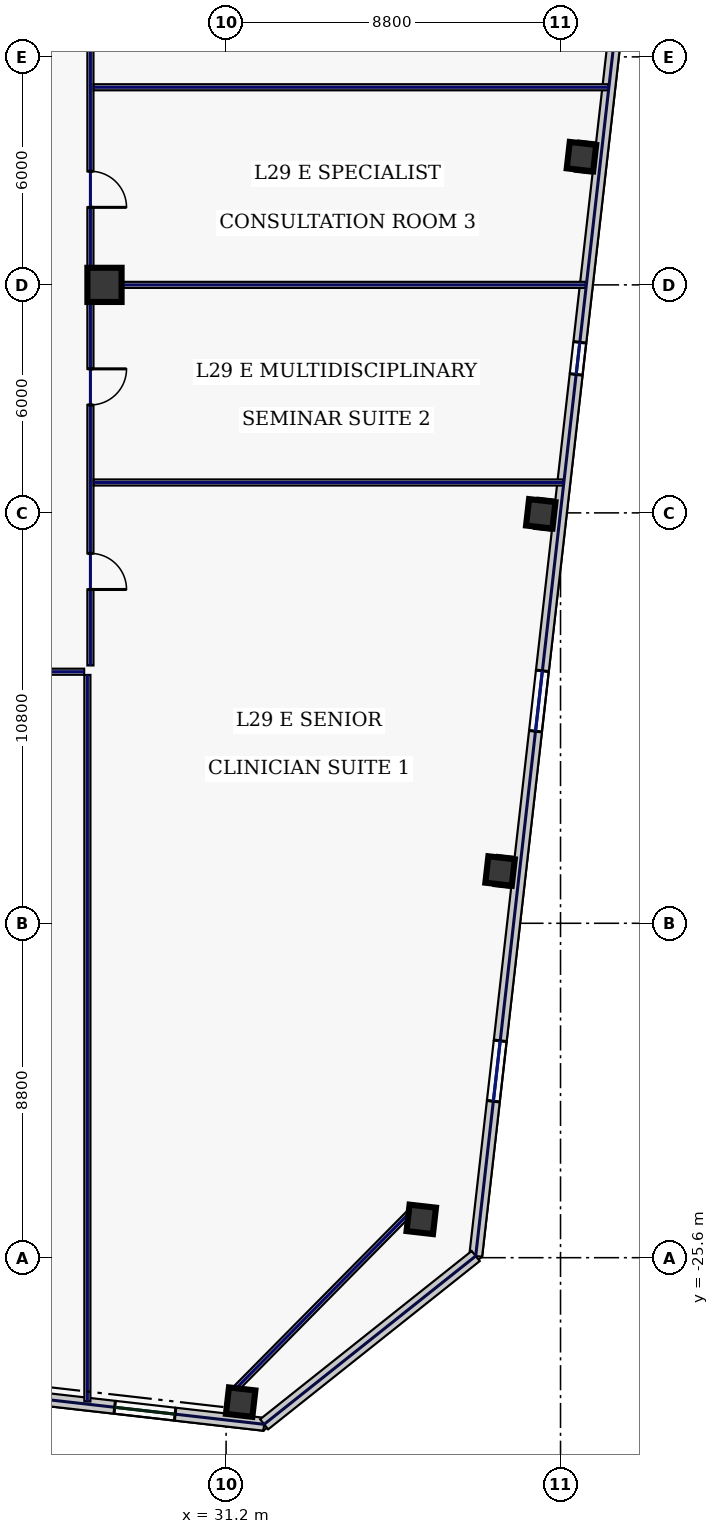
"""IFC4 building model, lengths in metres.
Left out: names, types, materials, properties, quantities, classifications, styles, units other than length and angle.
Written with IfcOpenShell. Run it as: python <this file> out.ifc"""

import sys

from ifc_helpers import new_model, si_unit, direction, frame, frame_2d, origin, origin_2d, place, context, subcontext, project, spatial, rectangle, hollow_rectangle, extrude, element, fill, save


model = new_model("IFC4")
c1 = context("Model", 3, precision=1e-05, world=origin(), true_north=direction((0.0, 1.0)))
c2 = subcontext(c1, "Body", "Model", "MODEL_VIEW")
j1 = project(units=[si_unit("LENGTHUNIT", "METRE"), si_unit("PLANEANGLEUNIT", "RADIAN")], contexts=[c1])
p1 = place(None, origin())
s1 = spatial("IfcSite", under=j1, at=p1, CompositionType="ELEMENT")
p2 = place(p1, origin())
s2 = spatial("IfcBuilding", under=s1, at=p2, CompositionType="ELEMENT")
p3 = place(p2, frame((0.0, 0.0, 129.4)))
s3 = spatial("IfcBuildingStorey", under=s2, at=p3, CompositionType="ELEMENT", Elevation=129.4)
p4 = place(p3, frame((28.0, 0.0, 0.0), z_axis=(0.0, 0.0, 1.0), x_axis=(1.0, 0.0, 0.0)))
e1 = element("IfcColumn", 1, at=p4, inside=s3, PredefinedType="COLUMN", context=c2, shape_type="SweptSolid", body=[
    extrude(hollow_rectangle(XDim=0.9, YDim=0.9, WallThickness=0.04, at=origin_2d()), origin(), (0.0, 0.0, 1.0), 3.74),
])
for number, where, z_axis, x_axis in (
    (2, (31.583, -29.401, 0.0), (0.0, 0.0, 1.0), (0.994, -0.113, 0.0)),
    (3, (36.336, -24.592, 0.0), (0.0, 0.0, 1.0), (0.994, -0.113, 0.0)),
    (4, (38.409, -15.424, 0.0), (0.0, 0.0, 1.0), (0.994, -0.113, 0.0)),
    (5, (39.48, -6.025, 0.0), (0.0, 0.0, 1.0), (0.994, -0.113, 0.0)),
    (6, (40.551, 3.375, 0.0), (0.0, 0.0, 1.0), (0.994, -0.113, 0.0)),
):
    element("IfcColumn", number, at=place(p3, frame(where, z_axis=z_axis, x_axis=x_axis)), inside=s3, PredefinedType="COLUMN", context=c2, shape_type="SweptSolid", body=[
        extrude(hollow_rectangle(XDim=0.7, YDim=0.7, WallThickness=0.032, at=origin_2d()), origin(), (0.0, 0.0, 1.0), 3.74),
    ])
p5 = place(p3, frame((11.115, -27.582, 0.0), z_axis=(0.0, 0.0, 1.0), x_axis=(0.993572655904, -0.113196190044, 0.0)))
e7 = element("IfcWall", 7, at=p5, inside=s3, PredefinedType="STANDARD", context=c2, shape_type="SweptSolid", body=[
    extrude(rectangle(XDim=21.223, YDim=0.34, at=frame_2d((10.611, 0.0))), origin(), (0.0, 0.0, 1.0), 3.74),
])
p6 = place(p5, frame((3.616, 0.0, 0.67)))
e8 = element("IfcOpeningElement", 8, at=p6, cuts=e7, PredefinedType="OPENING", context=c2, shape_type="SweptSolid", body=[
    extrude(rectangle(XDim=2.1, YDim=2.2, at=frame_2d((1.05, 1.1))), frame((0.0, 0.18, 0.0), z_axis=(0.0, -1.0, 0.0), x_axis=(1.0, 0.0, 0.0)), (0.0, 0.0, 1.0), 0.36),
])
p7 = place(p5, frame((7.838, 0.0, 0.67)))
e9 = element("IfcOpeningElement", 9, at=p7, cuts=e7, PredefinedType="OPENING", context=c2, shape_type="SweptSolid", body=[
    extrude(rectangle(XDim=2.1, YDim=2.2, at=frame_2d((1.05, 1.1))), frame((0.0, 0.18, 0.0), z_axis=(0.0, -1.0, 0.0), x_axis=(1.0, 0.0, 0.0)), (0.0, 0.0, 1.0), 0.36),
])
p8 = place(p5, frame((12.794, 0.0, 0.67)))
e10 = element("IfcOpeningElement", 10, at=p8, cuts=e7, PredefinedType="OPENING", context=c2, shape_type="SweptSolid", body=[
    extrude(rectangle(XDim=2.1, YDim=2.2, at=frame_2d((1.05, 1.1))), frame((0.0, 0.18, 0.0), z_axis=(0.0, -1.0, 0.0), x_axis=(1.0, 0.0, 0.0)), (0.0, 0.0, 1.0), 0.36),
])
p9 = place(p5, frame((17.265, 0.0, 0.22)))
e11 = element("IfcOpeningElement", 11, at=p9, cuts=e7, PredefinedType="OPENING", context=c2, shape_type="SweptSolid", body=[
    extrude(rectangle(XDim=1.6, YDim=1.2, at=frame_2d((0.8, 0.6))), frame((0.0, 0.18, 0.0), z_axis=(0.0, -1.0, 0.0), x_axis=(1.0, 0.0, 0.0)), (0.0, 0.0, 1.0), 0.36),
])
p10 = place(p3, frame((37.768, -25.556, 0.0), z_axis=(0.0, 0.0, 1.0), x_axis=(0.113201605824, 0.993572038877, 0.0)))
e12 = element("IfcWall", 12, at=p10, inside=s3, PredefinedType="STANDARD", context=c2, shape_type="SweptSolid", body=[
    extrude(rectangle(XDim=39.2, YDim=0.34, at=frame_2d((19.6, 0.0))), origin(), (0.0, 0.0, 1.0), 3.74),
])
p11 = place(p10, frame((4.1, 0.0, 0.58)))
e13 = element("IfcOpeningElement", 13, at=p11, cuts=e12, PredefinedType="OPENING", context=c2, shape_type="SweptSolid", body=[
    extrude(rectangle(XDim=1.6, YDim=2.3, at=frame_2d((0.8, 1.15))), frame((0.0, 0.18, 0.0), z_axis=(0.0, -1.0, 0.0), x_axis=(1.0, 0.0, 0.0)), (0.0, 0.0, 1.0), 0.36),
])
p12 = place(p10, frame((13.9, 0.0, 0.58)))
e14 = element("IfcOpeningElement", 14, at=p12, cuts=e12, PredefinedType="OPENING", context=c2, shape_type="SweptSolid", body=[
    extrude(rectangle(XDim=1.6, YDim=2.3, at=frame_2d((0.8, 1.15))), frame((0.0, 0.18, 0.0), z_axis=(0.0, -1.0, 0.0), x_axis=(1.0, 0.0, 0.0)), (0.0, 0.0, 1.0), 0.36),
])
p13 = place(p10, frame((23.35, 0.0, 0.75)))
e15 = element("IfcOpeningElement", 15, at=p13, cuts=e12, PredefinedType="OPENING", context=c2, shape_type="SweptSolid", body=[
    extrude(rectangle(XDim=0.85, YDim=1.85, at=frame_2d((0.425, 0.925))), frame((0.0, 0.18, 0.0), z_axis=(0.0, -1.0, 0.0), x_axis=(1.0, 0.0, 0.0)), (0.0, 0.0, 1.0), 0.36),
])
p14 = place(p10, frame((33.5, 0.0, 0.58)))
e16 = element("IfcOpeningElement", 16, at=p14, cuts=e12, PredefinedType="OPENING", context=c2, shape_type="SweptSolid", body=[
    extrude(rectangle(XDim=1.6, YDim=2.3, at=frame_2d((0.8, 1.15))), frame((0.0, 0.18, 0.0), z_axis=(0.0, -1.0, 0.0), x_axis=(1.0, 0.0, 0.0)), (0.0, 0.0, 1.0), 0.36),
])
p15 = place(p3, frame((32.201, -29.985, 0.0), z_axis=(0.0, 0.0, 1.0), x_axis=(0.78261359446, 0.622507800567, 0.0)))
e17 = element("IfcWall", 17, at=p15, inside=s3, PredefinedType="STANDARD", context=c2, shape_type="SweptSolid", body=[
    extrude(rectangle(XDim=7.114, YDim=0.34, at=frame_2d((3.557, 0.0))), origin(), (0.0, 0.0, 1.0), 3.74),
])
p16 = place(p3, frame((31.341, -29.162, 0.0), z_axis=(0.0, 0.0, 1.0), x_axis=(0.702905898933, 0.711282853192, 0.0)))
e18 = element("IfcWall", 18, at=p16, inside=s3, PredefinedType="PARTITIONING", context=c2, shape_type="SweptSolid", body=[
    extrude(rectangle(XDim=6.761, YDim=0.16, at=frame_2d((3.381, 0.0))), origin(), (0.0, 0.0, 1.0), 3.74),
])
p17 = place(p3, frame((27.63, 10.115, 0.0), z_axis=(0.0, 0.0, 1.0), x_axis=(0.0, -1.0, 0.0)))
e19 = element("IfcWall", 19, at=p17, inside=s3, PredefinedType="PARTITIONING", context=c2, shape_type="SweptSolid", body=[
    extrude(rectangle(XDim=20.13, YDim=0.16, at=frame_2d((10.065, 0.0))), origin(), (0.0, 0.0, 1.0), 3.74),
])
p18 = place(p17, frame((17.181, 0.0, 0.0)))
e20 = element("IfcOpeningElement", 20, at=p18, cuts=e19, PredefinedType="OPENING", context=c2, shape_type="SweptSolid", body=[
    extrude(rectangle(XDim=0.95, YDim=2.2, at=frame_2d((0.475, 1.1))), frame((0.0, 0.09, 0.0), z_axis=(0.0, -1.0, 0.0), x_axis=(1.0, 0.0, 0.0)), (0.0, 0.0, 1.0), 0.18),
])
p19 = place(p17, frame((12.325, 0.0, 0.0)))
e21 = element("IfcOpeningElement", 21, at=p19, cuts=e19, PredefinedType="OPENING", context=c2, shape_type="SweptSolid", body=[
    extrude(rectangle(XDim=0.95, YDim=2.2, at=frame_2d((0.475, 1.1))), frame((0.0, 0.09, 0.0), z_axis=(0.0, -1.0, 0.0), x_axis=(1.0, 0.0, 0.0)), (0.0, 0.0, 1.0), 0.18),
])
p20 = place(p17, frame((7.125, 0.0, 0.0)))
e22 = element("IfcOpeningElement", 22, at=p20, cuts=e19, PredefinedType="OPENING", context=c2, shape_type="SweptSolid", body=[
    extrude(rectangle(XDim=0.95, YDim=2.2, at=frame_2d((0.475, 1.1))), frame((0.0, 0.09, 0.0), z_axis=(0.0, -1.0, 0.0), x_axis=(1.0, 0.0, 0.0)), (0.0, 0.0, 1.0), 0.18),
])
p21 = place(p17, frame((2.219, 0.0, 0.0)))
e23 = element("IfcOpeningElement", 23, at=p21, cuts=e19, PredefinedType="OPENING", context=c2, shape_type="SweptSolid", body=[
    extrude(rectangle(XDim=0.95, YDim=2.2, at=frame_2d((0.475, 1.1))), frame((0.0, 0.09, 0.0), z_axis=(0.0, -1.0, 0.0), x_axis=(1.0, 0.0, 0.0)), (0.0, 0.0, 1.0), 0.18),
])
p22 = place(p3, frame((27.465, -10.18, 0.0), z_axis=(0.0, 0.0, 1.0), x_axis=(-1.0, 0.0, 0.0)))
e24 = element("IfcWall", 24, at=p22, inside=s3, PredefinedType="PARTITIONING", context=c2, shape_type="SweptSolid", body=[
    extrude(rectangle(XDim=54.93, YDim=0.16, at=frame_2d((27.465, 0.0))), origin(), (0.0, 0.0, 1.0), 3.74),
])
p23 = place(p22, frame((52.106, 0.0, 0.0)))
e25 = element("IfcOpeningElement", 25, at=p23, cuts=e24, PredefinedType="OPENING", context=c2, shape_type="SweptSolid", body=[
    extrude(rectangle(XDim=0.95, YDim=2.2, at=frame_2d((0.475, 1.1))), frame((0.0, 0.09, 0.0), z_axis=(0.0, -1.0, 0.0), x_axis=(1.0, 0.0, 0.0)), (0.0, 0.0, 1.0), 0.18),
])
p24 = place(p22, frame((47.05, 0.0, 0.0)))
e26 = element("IfcOpeningElement", 26, at=p24, cuts=e24, PredefinedType="OPENING", context=c2, shape_type="SweptSolid", body=[
    extrude(rectangle(XDim=0.95, YDim=2.2, at=frame_2d((0.475, 1.1))), frame((0.0, 0.09, 0.0), z_axis=(0.0, -1.0, 0.0), x_axis=(1.0, 0.0, 0.0)), (0.0, 0.0, 1.0), 0.18),
])
p25 = place(p22, frame((41.65, 0.0, 0.0)))
e27 = element("IfcOpeningElement", 27, at=p25, cuts=e24, PredefinedType="OPENING", context=c2, shape_type="SweptSolid", body=[
    extrude(rectangle(XDim=0.95, YDim=2.2, at=frame_2d((0.475, 1.1))), frame((0.0, 0.09, 0.0), z_axis=(0.0, -1.0, 0.0), x_axis=(1.0, 0.0, 0.0)), (0.0, 0.0, 1.0), 0.18),
])
p26 = place(p22, frame((35.825, 0.0, 0.0)))
e28 = element("IfcOpeningElement", 28, at=p26, cuts=e24, PredefinedType="OPENING", context=c2, shape_type="SweptSolid", body=[
    extrude(rectangle(XDim=0.95, YDim=2.2, at=frame_2d((0.475, 1.1))), frame((0.0, 0.09, 0.0), z_axis=(0.0, -1.0, 0.0), x_axis=(1.0, 0.0, 0.0)), (0.0, 0.0, 1.0), 0.18),
])
p27 = place(p22, frame((29.575, 0.0, 0.0)))
e29 = element("IfcOpeningElement", 29, at=p27, cuts=e24, PredefinedType="OPENING", context=c2, shape_type="SweptSolid", body=[
    extrude(rectangle(XDim=0.95, YDim=2.2, at=frame_2d((0.475, 1.1))), frame((0.0, 0.09, 0.0), z_axis=(0.0, -1.0, 0.0), x_axis=(1.0, 0.0, 0.0)), (0.0, 0.0, 1.0), 0.18),
])
p28 = place(p22, frame((23.285, 0.0, 0.0)))
e30 = element("IfcOpeningElement", 30, at=p28, cuts=e24, PredefinedType="OPENING", context=c2, shape_type="SweptSolid", body=[
    extrude(rectangle(XDim=0.95, YDim=2.2, at=frame_2d((0.475, 1.1))), frame((0.0, 0.09, 0.0), z_axis=(0.0, -1.0, 0.0), x_axis=(1.0, 0.0, 0.0)), (0.0, 0.0, 1.0), 0.18),
])
p29 = place(p22, frame((16.78, 0.0, 0.0)))
e31 = element("IfcOpeningElement", 31, at=p29, cuts=e24, PredefinedType="OPENING", context=c2, shape_type="SweptSolid", body=[
    extrude(rectangle(XDim=1.3, YDim=2.2, at=frame_2d((0.65, 1.1))), frame((0.0, 0.09, 0.0), z_axis=(0.0, -1.0, 0.0), x_axis=(1.0, 0.0, 0.0)), (0.0, 0.0, 1.0), 0.18),
])
p30 = place(p22, frame((11.23, 0.0, 0.0)))
e32 = element("IfcOpeningElement", 32, at=p30, cuts=e24, PredefinedType="OPENING", context=c2, shape_type="SweptSolid", body=[
    extrude(rectangle(XDim=1.3, YDim=2.2, at=frame_2d((0.65, 1.1))), frame((0.0, 0.09, 0.0), z_axis=(0.0, -1.0, 0.0), x_axis=(1.0, 0.0, 0.0)), (0.0, 0.0, 1.0), 0.18),
])
p31 = place(p22, frame((6.46, 0.0, 0.0)))
e33 = element("IfcOpeningElement", 33, at=p31, cuts=e24, PredefinedType="OPENING", context=c2, shape_type="SweptSolid", body=[
    extrude(rectangle(XDim=1.3, YDim=2.2, at=frame_2d((0.65, 1.1))), frame((0.0, 0.09, 0.0), z_axis=(0.0, -1.0, 0.0), x_axis=(1.0, 0.0, 0.0)), (0.0, 0.0, 1.0), 0.18),
])
p32 = place(p22, frame((2.194, 0.0, 0.0)))
e34 = element("IfcOpeningElement", 34, at=p32, cuts=e24, PredefinedType="OPENING", context=c2, shape_type="SweptSolid", body=[
    extrude(rectangle(XDim=0.95, YDim=2.2, at=frame_2d((0.475, 1.1))), frame((0.0, 0.09, 0.0), z_axis=(0.0, -1.0, 0.0), x_axis=(1.0, 0.0, 0.0)), (0.0, 0.0, 1.0), 0.18),
])
p33 = place(p3, frame((27.55, -29.385, 0.0), z_axis=(0.0, 0.0, 1.0), x_axis=(0.0, 1.0, 0.0)))
e35 = element("IfcWall", 35, at=p33, inside=s3, PredefinedType="PARTITIONING", context=c2, shape_type="SweptSolid", body=[
    extrude(rectangle(XDim=19.12, YDim=0.16, at=frame_2d((9.56, 0.0))), origin(), (0.0, 0.0, 1.0), 3.74),
])
p34 = place(p3, frame((27.715, -5.2, 0.0), z_axis=(0.0, 0.0, 1.0), x_axis=(1.0, 0.0, 0.0)))
e36 = element("IfcWall", 36, at=p34, inside=s3, PredefinedType="PARTITIONING", context=c2, shape_type="SweptSolid", body=[
    extrude(rectangle(XDim=12.352, YDim=0.16, at=frame_2d((6.176, 0.0))), origin(), (0.0, 0.0, 1.0), 3.74),
])
p35 = place(p3, frame((27.715, 0.0, 0.0), z_axis=(0.0, 0.0, 1.0), x_axis=(1.0, 0.0, 0.0)))
e37 = element("IfcWall", 37, at=p35, inside=s3, PredefinedType="PARTITIONING", context=c2, shape_type="SweptSolid", body=[
    extrude(rectangle(XDim=12.945, YDim=0.16, at=frame_2d((6.472, 0.0))), origin(), (0.0, 0.0, 1.0), 3.235),
])
p36 = place(p3, frame((27.715, 5.2, 0.0), z_axis=(0.0, 0.0, 1.0), x_axis=(1.0, 0.0, 0.0)))
e38 = element("IfcWall", 38, at=p36, inside=s3, PredefinedType="PARTITIONING", context=c2, shape_type="SweptSolid", body=[
    extrude(rectangle(XDim=13.537, YDim=0.16, at=frame_2d((6.769, 0.0))), origin(), (0.0, 0.0, 1.0), 3.74),
])
p37 = place(p9, origin())
e39 = element("IfcWindow", 39, at=p37, inside=s3, PartitioningType="SINGLE_PANEL", PredefinedType="WINDOW", context=c2, shape_type="SweptSolid", body=[
    extrude(rectangle(XDim=1.6, YDim=1.2, at=frame_2d((0.8, 0.6))), frame((0.0, 0.03, 0.0), z_axis=(0.0, -1.0, 0.0), x_axis=(1.0, 0.0, 0.0)), (0.0, 0.0, 1.0), 0.06),
])
fill(e11, e39)
p38 = place(p11, origin())
e40 = element("IfcWindow", 40, at=p38, inside=s3, PartitioningType="SINGLE_PANEL", PredefinedType="WINDOW", context=c2, shape_type="SweptSolid", body=[
    extrude(rectangle(XDim=1.6, YDim=2.3, at=frame_2d((0.8, 1.15))), frame((0.0, 0.03, 0.0), z_axis=(0.0, -1.0, 0.0), x_axis=(1.0, 0.0, 0.0)), (0.0, 0.0, 1.0), 0.06),
])
fill(e13, e40)
p39 = place(p12, origin())
e41 = element("IfcWindow", 41, at=p39, inside=s3, PartitioningType="SINGLE_PANEL", PredefinedType="WINDOW", context=c2, shape_type="SweptSolid", body=[
    extrude(rectangle(XDim=1.6, YDim=2.3, at=frame_2d((0.8, 1.15))), frame((0.0, 0.03, 0.0), z_axis=(0.0, -1.0, 0.0), x_axis=(1.0, 0.0, 0.0)), (0.0, 0.0, 1.0), 0.06),
])
fill(e14, e41)
p40 = place(p13, origin())
e42 = element("IfcWindow", 42, at=p40, inside=s3, PartitioningType="SINGLE_PANEL", PredefinedType="WINDOW", context=c2, shape_type="SweptSolid", body=[
    extrude(rectangle(XDim=0.85, YDim=1.85, at=frame_2d((0.425, 0.925))), frame((0.0, 0.03, 0.0), z_axis=(0.0, -1.0, 0.0), x_axis=(1.0, 0.0, 0.0)), (0.0, 0.0, 1.0), 0.06),
])
fill(e15, e42)
p41 = place(p18, origin())
e43 = element("IfcDoor", 43, at=p41, inside=s3, OperationType="SINGLE_SWING_RIGHT", PredefinedType="DOOR", context=c2, shape_type="SweptSolid", body=[
    extrude(rectangle(XDim=0.95, YDim=2.2, at=frame_2d((0.475, 1.1))), frame((0.0, 0.025, 0.0), z_axis=(0.0, -1.0, 0.0), x_axis=(1.0, 0.0, 0.0)), (0.0, 0.0, 1.0), 0.05),
])
fill(e20, e43)
p42 = place(p19, origin())
e44 = element("IfcDoor", 44, at=p42, inside=s3, OperationType="SINGLE_SWING_LEFT", PredefinedType="DOOR", context=c2, shape_type="SweptSolid", body=[
    extrude(rectangle(XDim=0.95, YDim=2.2, at=frame_2d((0.475, 1.1))), frame((0.0, 0.025, 0.0), z_axis=(0.0, -1.0, 0.0), x_axis=(1.0, 0.0, 0.0)), (0.0, 0.0, 1.0), 0.05),
])
fill(e21, e44)
p43 = place(p20, origin())
e45 = element("IfcDoor", 45, at=p43, inside=s3, OperationType="SINGLE_SWING_RIGHT", PredefinedType="DOOR", context=c2, shape_type="SweptSolid", body=[
    extrude(rectangle(XDim=0.95, YDim=2.2, at=frame_2d((0.475, 1.1))), frame((0.0, 0.025, 0.0), z_axis=(0.0, -1.0, 0.0), x_axis=(1.0, 0.0, 0.0)), (0.0, 0.0, 1.0), 0.05),
])
fill(e22, e45)
save(model, sys.argv[1])
